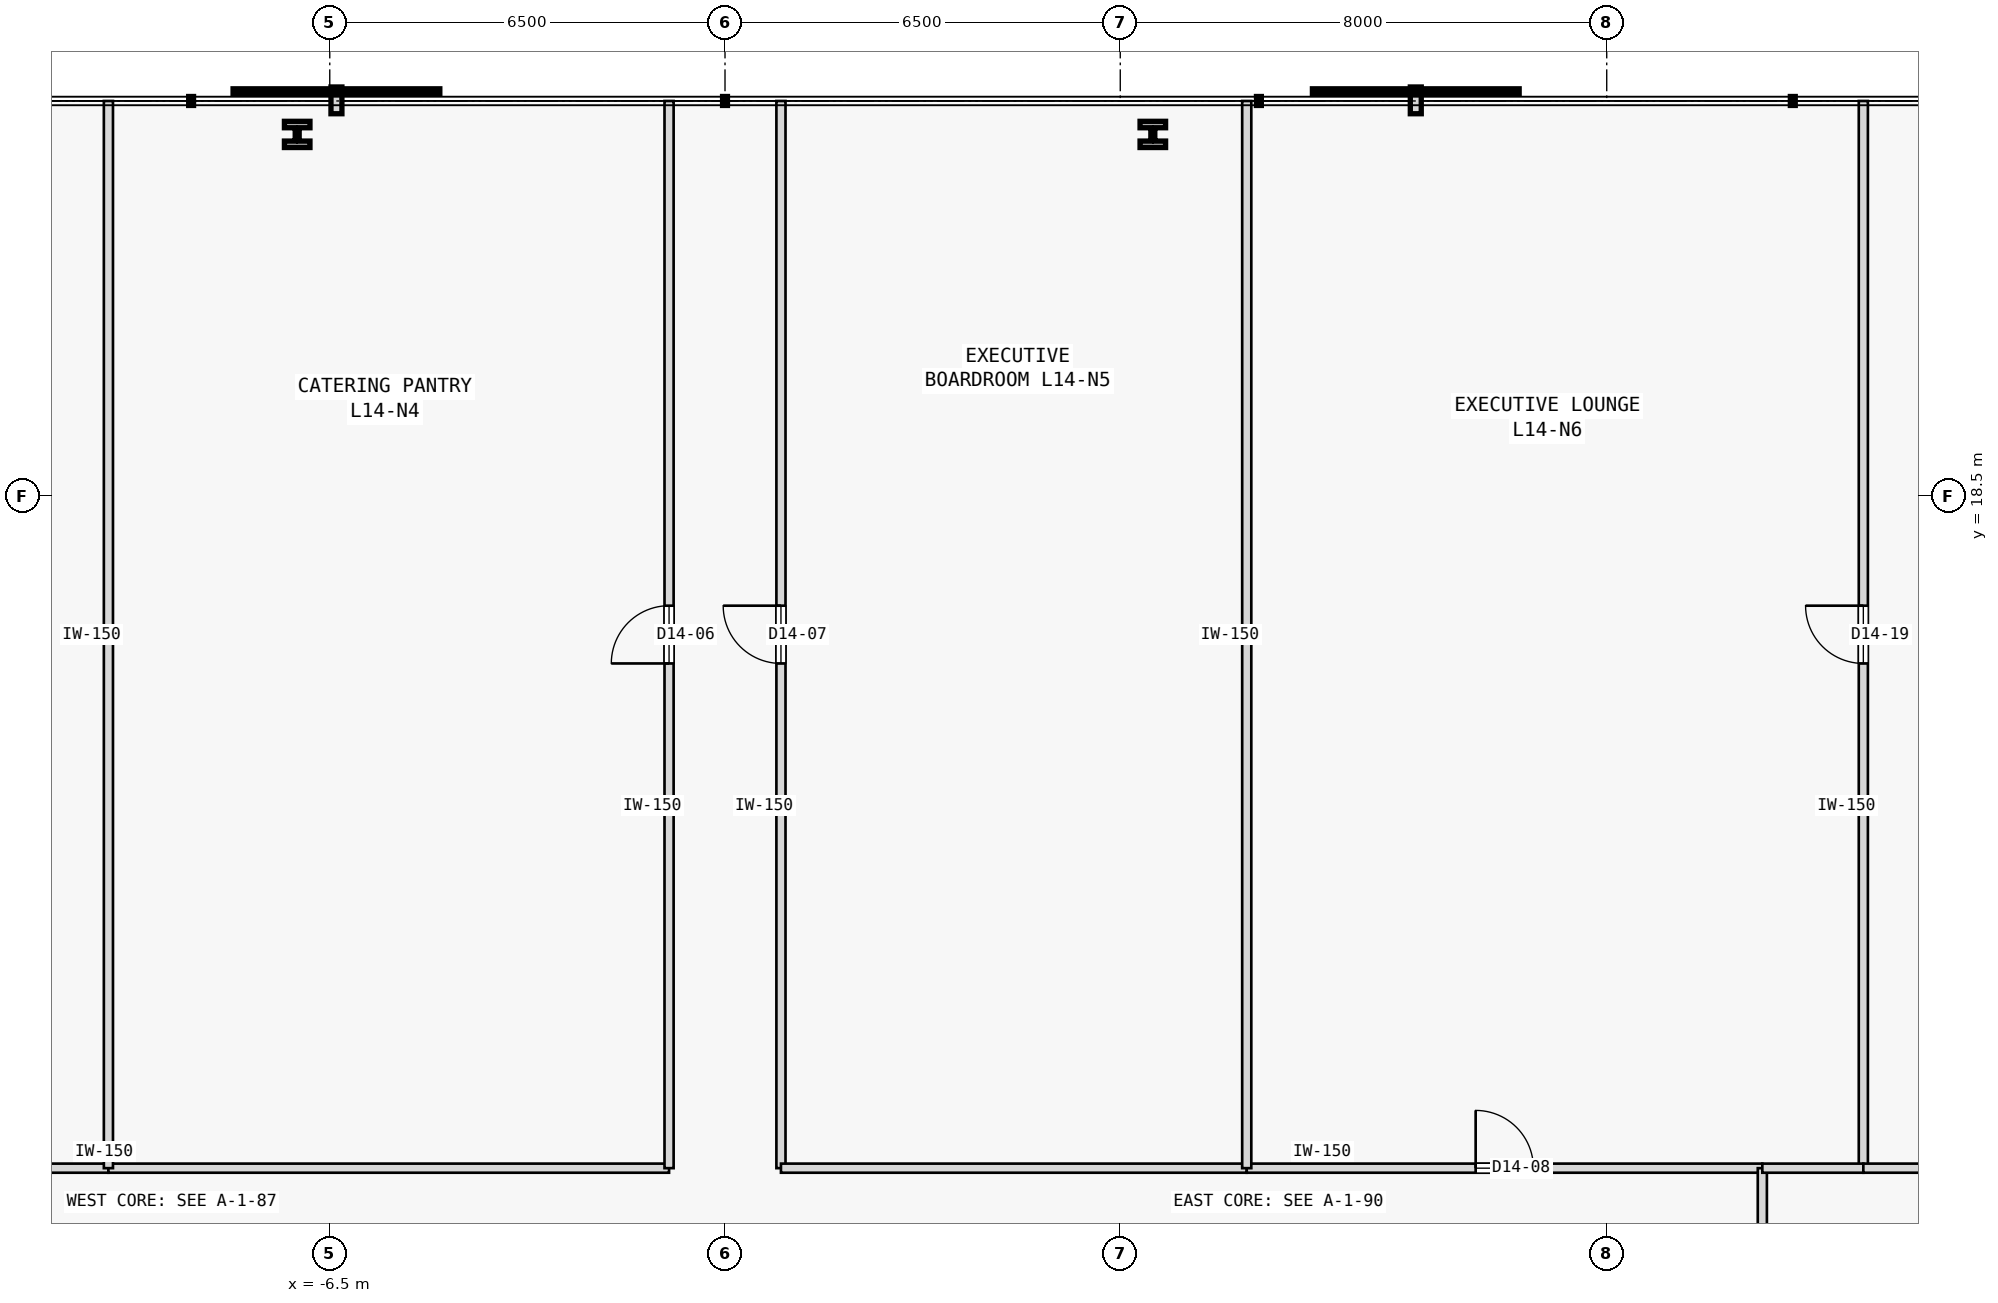
"""IFC4 building model, lengths in metres.
Left out: names, types, materials, properties, quantities, classifications, styles, units other than length and angle.
Written with IfcOpenShell. Run it as: python <this file> out.ifc"""

import sys

from ifc_helpers import new_model, si_unit, direction, frame, frame_2d, origin, origin_2d, place, context, subcontext, project, spatial, rectangle, i_section, extrude, element, fill, save


model = new_model("IFC4")
c1 = context("Model", 3, precision=1e-05, world=origin(), true_north=direction((0.0, 1.0)))
c2 = subcontext(c1, "Body", "Model", "MODEL_VIEW")
j1 = project(units=[si_unit("LENGTHUNIT", "METRE"), si_unit("PLANEANGLEUNIT", "RADIAN")], contexts=[c1])
p1 = place(None, origin())
s1 = spatial("IfcSite", under=j1, at=p1, CompositionType="ELEMENT")
p2 = place(p1, origin())
s2 = spatial("IfcBuilding", under=s1, at=p2, CompositionType="ELEMENT")
p3 = place(p2, frame((0.0, 0.0, 59.8)))
s3 = spatial("IfcBuildingStorey", under=s2, at=p3, CompositionType="ELEMENT", Elevation=59.8)
for number, where, z_axis, x_axis in (
    (1, (7.036, 24.45, 0.0), (0.0, 0.0, 1.0), (1.0, 0.0, 0.0)),
    (2, (-7.036, 24.45, 0.0), (0.0, 0.0, 1.0), (1.0, 0.0, 0.0)),
):
    element("IfcColumn", number, at=place(p3, frame(where, z_axis=z_axis, x_axis=x_axis)), inside=s3, PredefinedType="COLUMN", context=c2, shape_type="SweptSolid", body=[
        extrude(i_section(OverallWidth=0.42, OverallDepth=0.431, WebThickness=0.065, FlangeThickness=0.106, FilletRadius=0.015, at=origin_2d()), origin(), (0.0, 0.0, 1.0), 3.8),
    ])
p4 = place(p3, frame((-17.059, 7.45, 0.0), z_axis=(0.0, 0.0, 1.0), x_axis=(1.0, 0.0, 0.0)))
e3 = element("IfcWall", 3, at=p4, inside=s3, PredefinedType="PARTITIONING", context=c2, shape_type="SweptSolid", body=[
    extrude(rectangle(XDim=6.919, YDim=0.15, at=frame_2d((3.459, 0.0))), origin(), (0.0, 0.0, 1.0), 3.575),
])
p5 = place(p4, frame((2.985, 0.0, 0.0)))
e4 = element("IfcOpeningElement", 4, at=p5, cuts=e3, PredefinedType="OPENING", context=c2, shape_type="SweptSolid", body=[
    extrude(rectangle(XDim=0.95, YDim=2.15, at=frame_2d((0.475, 1.075))), frame((0.0, 0.085, 0.0), z_axis=(0.0, -1.0, 0.0), x_axis=(1.0, 0.0, 0.0)), (0.0, 0.0, 1.0), 0.17),
])
p6 = place(p3, frame((-10.14, 7.45, 0.0), z_axis=(0.0, 0.0, 1.0), x_axis=(1.0, 0.0, 0.0)))
e5 = element("IfcWall", 5, at=p6, inside=s3, PredefinedType="PARTITIONING", context=c2, shape_type="SweptSolid", body=[
    extrude(rectangle(XDim=9.22, YDim=0.15, at=frame_2d((4.61, 0.0))), origin(), (0.0, 0.0, 1.0), 3.575),
])
p7 = place(p3, frame((-0.92, 7.45, 0.0), z_axis=(0.0, 0.0, 1.0), x_axis=(0.0, 1.0, 0.0)))
e6 = element("IfcWall", 6, at=p7, inside=s3, PredefinedType="PARTITIONING", context=c2, shape_type="SweptSolid", body=[
    extrude(rectangle(XDim=17.55, YDim=0.15, at=frame_2d((8.775, 0.0))), origin(), (0.0, 0.0, 1.0), 3.575),
])
p8 = place(p7, frame((8.3, 0.0, 0.0)))
e7 = element("IfcOpeningElement", 7, at=p8, cuts=e6, PredefinedType="OPENING", context=c2, shape_type="SweptSolid", body=[
    extrude(rectangle(XDim=0.95, YDim=2.15, at=frame_2d((0.475, 1.075))), frame((0.0, 0.085, 0.0), z_axis=(0.0, -1.0, 0.0), x_axis=(1.0, 0.0, 0.0)), (0.0, 0.0, 1.0), 0.17),
])
p9 = place(p3, frame((0.92, 7.45, 0.0), z_axis=(0.0, 0.0, 1.0), x_axis=(0.0, 1.0, 0.0)))
e8 = element("IfcWall", 8, at=p9, inside=s3, PredefinedType="PARTITIONING", context=c2, shape_type="SweptSolid", body=[
    extrude(rectangle(XDim=17.55, YDim=0.15, at=frame_2d((8.775, 0.0))), origin(), (0.0, 0.0, 1.0), 3.575),
])
p10 = place(p9, frame((8.3, 0.0, 0.0)))
e9 = element("IfcOpeningElement", 9, at=p10, cuts=e8, PredefinedType="OPENING", context=c2, shape_type="SweptSolid", body=[
    extrude(rectangle(XDim=0.95, YDim=2.15, at=frame_2d((0.475, 1.075))), frame((0.0, 0.085, 0.0), z_axis=(0.0, -1.0, 0.0), x_axis=(1.0, 0.0, 0.0)), (0.0, 0.0, 1.0), 0.17),
])
p11 = place(p3, frame((0.92, 7.45, 0.0), z_axis=(0.0, 0.0, 1.0), x_axis=(1.0, 0.0, 0.0)))
e10 = element("IfcWall", 10, at=p11, inside=s3, PredefinedType="PARTITIONING", context=c2, shape_type="SweptSolid", body=[
    extrude(rectangle(XDim=7.66, YDim=0.15, at=frame_2d((3.83, 0.0))), origin(), (0.0, 0.0, 1.0), 3.575),
])
p12 = place(p3, frame((8.58, 7.45, 0.0), z_axis=(0.0, 0.0, 1.0), x_axis=(1.0, 0.0, 0.0)))
e11 = element("IfcWall", 11, at=p12, inside=s3, PredefinedType="PARTITIONING", context=c2, shape_type="SweptSolid", body=[
    extrude(rectangle(XDim=8.479, YDim=0.15, at=frame_2d((4.24, 0.0))), origin(), (0.0, 0.0, 1.0), 3.575),
])
p13 = place(p12, frame((3.764, 0.0, 0.0)))
e12 = element("IfcOpeningElement", 12, at=p13, cuts=e11, PredefinedType="OPENING", context=c2, shape_type="SweptSolid", body=[
    extrude(rectangle(XDim=0.95, YDim=2.15, at=frame_2d((0.475, 1.075))), frame((0.0, 0.085, 0.0), z_axis=(0.0, -1.0, 0.0), x_axis=(1.0, 0.0, 0.0)), (0.0, 0.0, 1.0), 0.17),
])
p14 = place(p3, frame((17.059, 0.92, 0.0), z_axis=(0.0, 0.0, 1.0), x_axis=(0.0, 1.0, 0.0)))
e13 = element("IfcWall", 13, at=p14, inside=s3, PredefinedType="PARTITIONING", context=c2, shape_type="SweptSolid", body=[
    extrude(rectangle(XDim=6.53, YDim=0.15, at=frame_2d((3.265, 0.0))), origin(), (0.0, 0.0, 1.0), 3.575),
])
for number, where, z_axis, x_axis in (
    (14, (-10.14, 7.45, 0.0), (0.0, 0.0, 1.0), (0.0, 1.0, 0.0)),
    (15, (8.58, 7.45, 0.0), (0.0, 0.0, 1.0), (0.0, 1.0, 0.0)),
):
    element("IfcWall", number, at=place(p3, frame(where, z_axis=z_axis, x_axis=x_axis)), inside=s3, PredefinedType="PARTITIONING", context=c2, shape_type="SweptSolid", body=[
        extrude(rectangle(XDim=17.55, YDim=0.15, at=frame_2d((8.775, 0.0))), origin(), (0.0, 0.0, 1.0), 3.575),
    ])
p15 = place(p3, frame((18.72, 7.45, 0.0), z_axis=(0.0, 0.0, 1.0), x_axis=(0.0, 1.0, 0.0)))
e16 = element("IfcWall", 16, at=p15, inside=s3, PredefinedType="PARTITIONING", context=c2, shape_type="SweptSolid", body=[
    extrude(rectangle(XDim=17.55, YDim=0.15, at=frame_2d((8.775, 0.0))), origin(), (0.0, 0.0, 1.0), 3.575),
])
p16 = place(p15, frame((8.3, 0.0, 0.0)))
e17 = element("IfcOpeningElement", 17, at=p16, cuts=e16, PredefinedType="OPENING", context=c2, shape_type="SweptSolid", body=[
    extrude(rectangle(XDim=0.95, YDim=2.15, at=frame_2d((0.475, 1.075))), frame((0.0, 0.085, 0.0), z_axis=(0.0, -1.0, 0.0), x_axis=(1.0, 0.0, 0.0)), (0.0, 0.0, 1.0), 0.17),
])
p17 = place(p3, frame((17.059, 7.45, 0.0), z_axis=(0.0, 0.0, 1.0), x_axis=(1.0, 0.0, 0.0)))
e18 = element("IfcWall", 18, at=p17, inside=s3, PredefinedType="PARTITIONING", context=c2, shape_type="SweptSolid", body=[
    extrude(rectangle(XDim=1.661, YDim=0.15, at=frame_2d((0.831, 0.0))), origin(), (0.0, 0.0, 1.0), 3.575),
])
p18 = place(p3, frame((18.72, 7.45, 0.0), z_axis=(0.0, 0.0, 1.0), x_axis=(1.0, 0.0, 0.0)))
e19 = element("IfcWall", 19, at=p18, inside=s3, PredefinedType="PARTITIONING", context=c2, shape_type="SweptSolid", body=[
    extrude(rectangle(XDim=10.14, YDim=0.15, at=frame_2d((5.07, 0.0))), origin(), (0.0, 0.0, 1.0), 3.125),
])
p19 = place(p8, origin())
e20 = element("IfcDoor", 20, at=p19, inside=s3, OperationType="SINGLE_SWING_LEFT", PredefinedType="DOOR", context=c2, shape_type="SweptSolid", body=[
    extrude(rectangle(XDim=0.95, YDim=2.15, at=frame_2d((0.475, 1.075))), frame((0.0, 0.025, 0.0), z_axis=(0.0, -1.0, 0.0), x_axis=(1.0, 0.0, 0.0)), (0.0, 0.0, 1.0), 0.05),
])
fill(e7, e20)
p20 = place(p10, origin())
e21 = element("IfcDoor", 21, at=p20, inside=s3, OperationType="SINGLE_SWING_RIGHT", PredefinedType="DOOR", context=c2, shape_type="SweptSolid", body=[
    extrude(rectangle(XDim=0.95, YDim=2.15, at=frame_2d((0.475, 1.075))), frame((0.0, 0.025, 0.0), z_axis=(0.0, -1.0, 0.0), x_axis=(1.0, 0.0, 0.0)), (0.0, 0.0, 1.0), 0.05),
])
fill(e9, e21)
p21 = place(p13, origin())
e22 = element("IfcDoor", 22, at=p21, inside=s3, OperationType="SINGLE_SWING_LEFT", PredefinedType="DOOR", context=c2, shape_type="SweptSolid", body=[
    extrude(rectangle(XDim=0.95, YDim=2.15, at=frame_2d((0.475, 1.075))), frame((0.0, 0.025, 0.0), z_axis=(0.0, -1.0, 0.0), x_axis=(1.0, 0.0, 0.0)), (0.0, 0.0, 1.0), 0.05),
])
fill(e12, e22)
p22 = place(p16, origin())
e23 = element("IfcDoor", 23, at=p22, inside=s3, OperationType="SINGLE_SWING_RIGHT", PredefinedType="DOOR", context=c2, shape_type="SweptSolid", body=[
    extrude(rectangle(XDim=0.95, YDim=2.15, at=frame_2d((0.475, 1.075))), frame((0.0, 0.025, 0.0), z_axis=(0.0, -1.0, 0.0), x_axis=(1.0, 0.0, 0.0)), (0.0, 0.0, 1.0), 0.05),
])
fill(e17, e23)
save(model, sys.argv[1])
